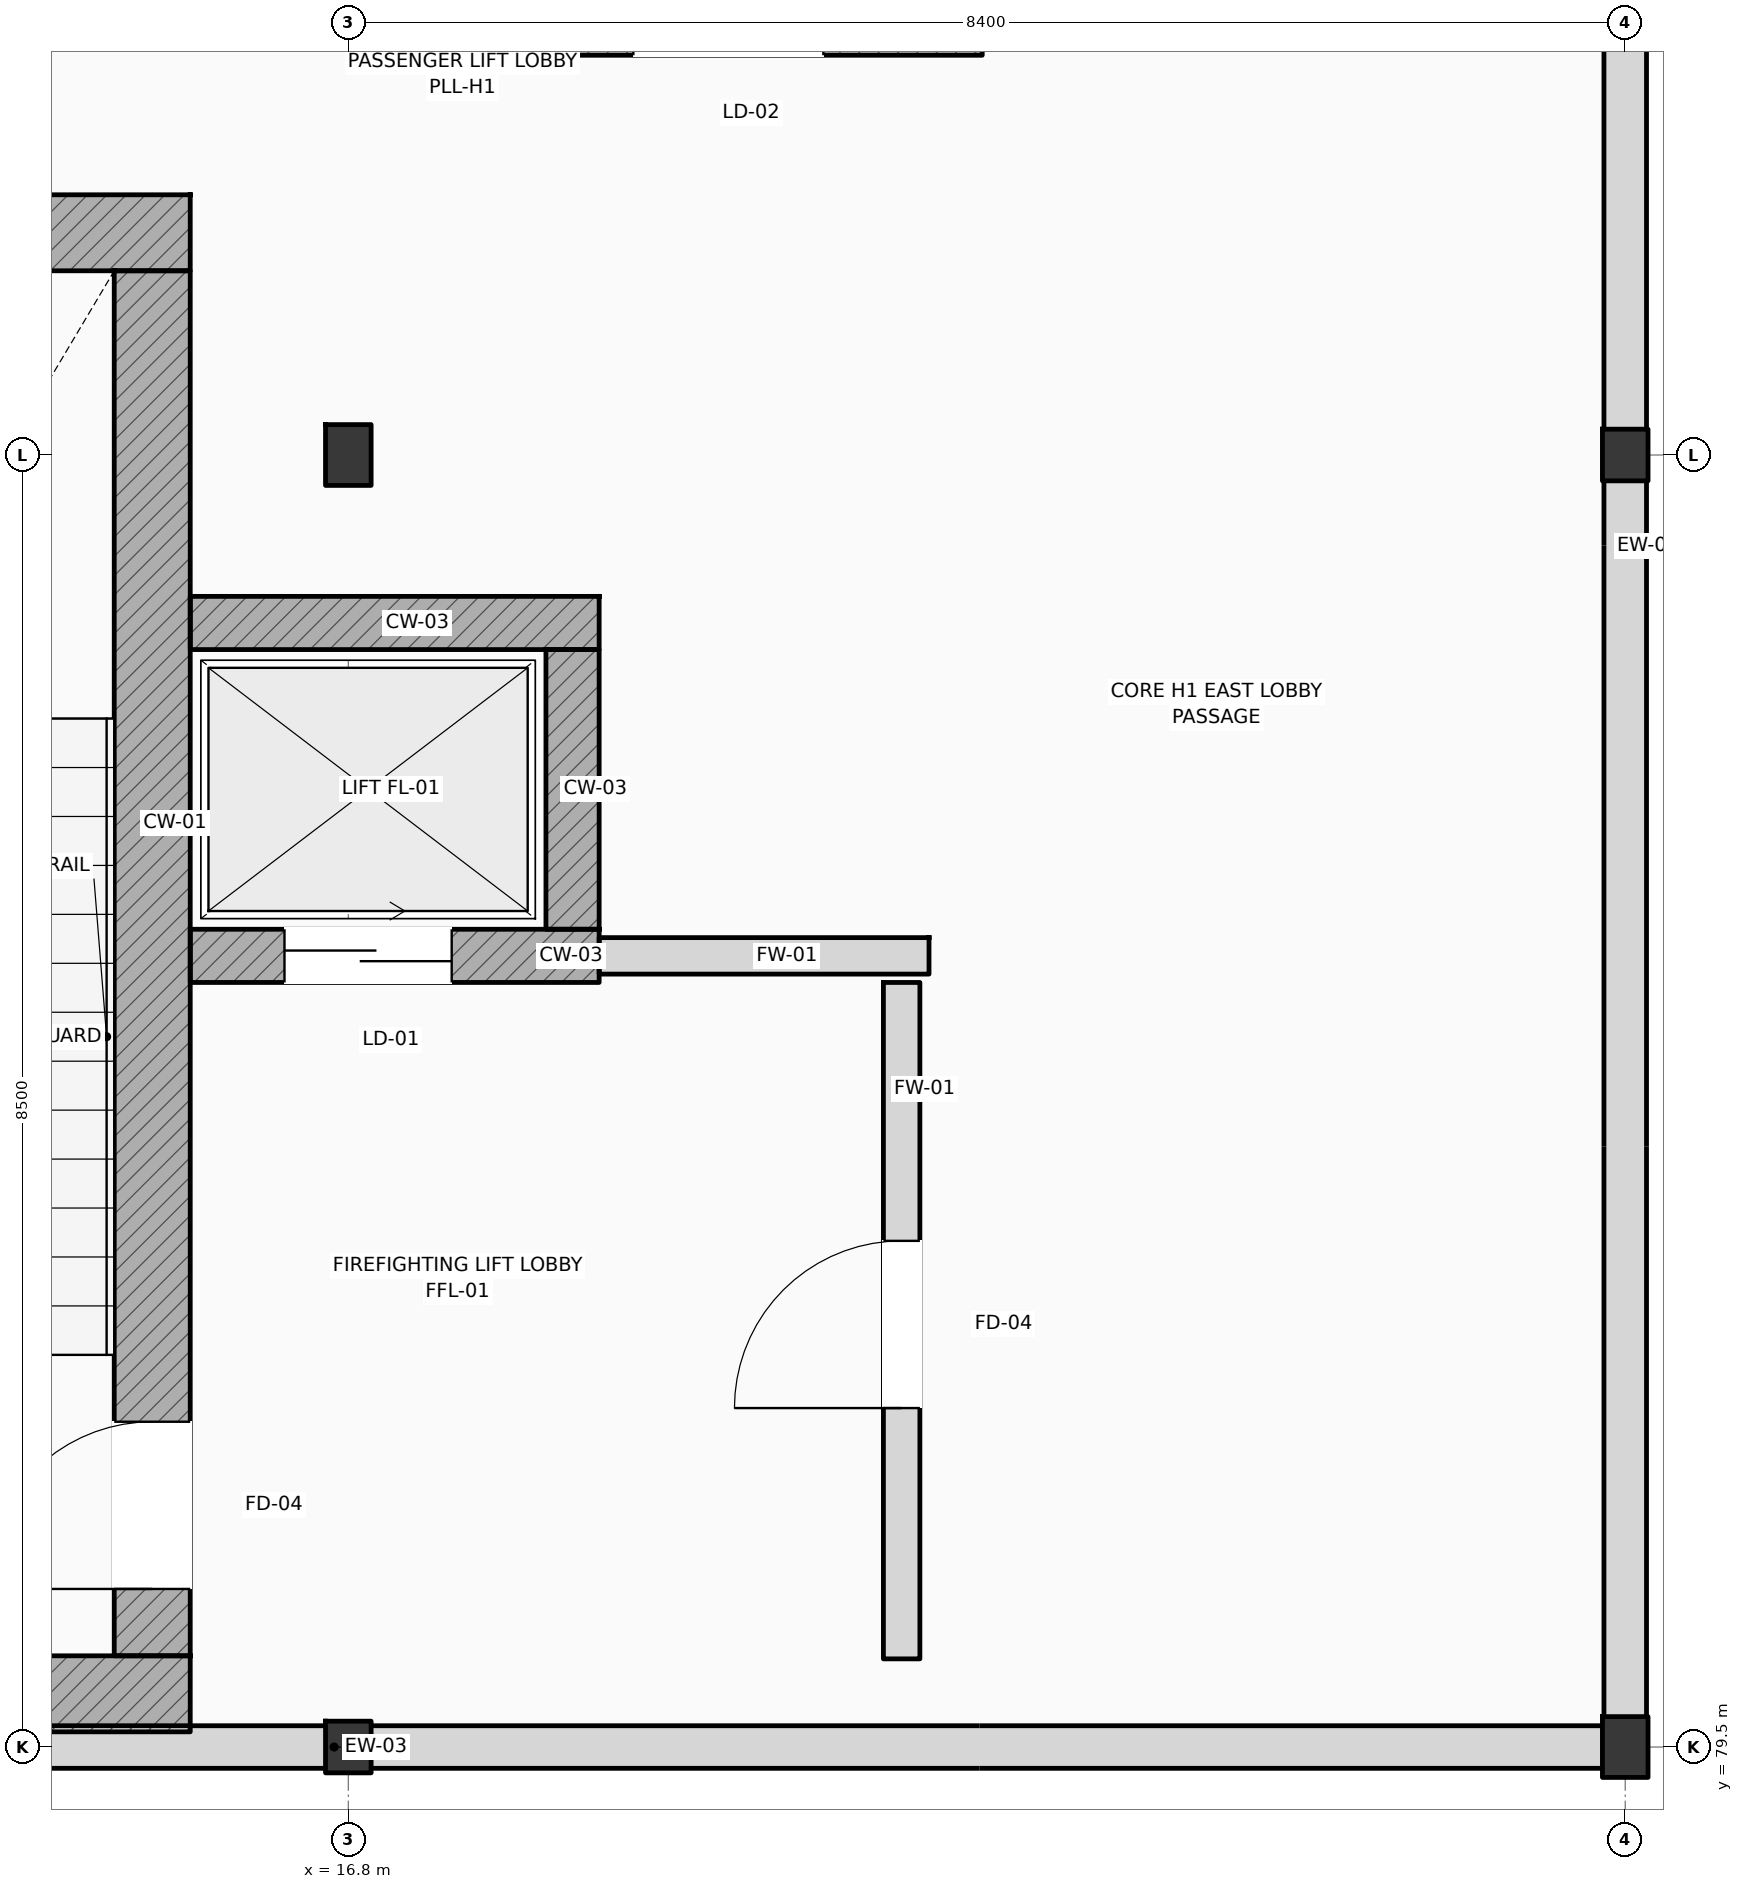
"""IFC4 building model, lengths in metres.
Left out: names, types, materials, properties, quantities, classifications, styles, units other than length and angle.
Written with IfcOpenShell. Run it as: python <this file> out.ifc"""

import sys

from ifc_helpers import new_model, si_unit, direction, frame, frame_2d, origin, origin_2d, place, context, subcontext, project, spatial, rectangle, i_section, extrude, element, fill, save


model = new_model("IFC4")
c1 = context("Model", 3, precision=1e-05, world=origin(), true_north=direction((0.0, 1.0)))
c2 = subcontext(c1, "Body", "Model", "MODEL_VIEW")
j1 = project(units=[si_unit("LENGTHUNIT", "METRE"), si_unit("PLANEANGLEUNIT", "RADIAN")], contexts=[c1])
p1 = place(None, origin())
s1 = spatial("IfcSite", under=j1, at=p1, CompositionType="ELEMENT")
p2 = place(p1, origin())
s2 = spatial("IfcBuilding", under=s1, at=p2, CompositionType="ELEMENT")
p3 = place(p2, frame((0.0, 0.0, 46.8)))
s3 = spatial("IfcBuildingStorey", under=s2, at=p3, CompositionType="ELEMENT", Elevation=46.8)
p4 = place(p3, frame((16.8, 79.5, 0.0), z_axis=(0.0, 0.0, 1.0), x_axis=(1.0, 0.0, 0.0)))
e1 = element("IfcColumn", 1, at=p4, inside=s3, PredefinedType="COLUMN", context=c2, shape_type="SweptSolid", body=[
    extrude(i_section(OverallWidth=0.3, OverallDepth=0.34, WebThickness=0.012, FlangeThickness=0.021, FilletRadius=0.027, at=origin_2d()), origin(), (0.0, 0.0, 1.0), 4.8),
])
for number, where, z_axis, x_axis in (
    (2, (16.8, 88.0, 0.0), (0.0, 0.0, 1.0), (1.0, 0.0, 0.0)),
    (3, (25.2, 79.5, 0.0), (0.0, 0.0, 1.0), (1.0, 0.0, 0.0)),
):
    element("IfcColumn", number, at=place(p3, frame(where, z_axis=z_axis, x_axis=x_axis)), inside=s3, PredefinedType="COLUMN", context=c2, shape_type="SweptSolid", body=[
        extrude(i_section(OverallWidth=0.3, OverallDepth=0.4, WebThickness=0.013, FlangeThickness=0.024, FilletRadius=0.027, at=origin_2d()), origin(), (0.0, 0.0, 1.0), 4.8),
    ])
p5 = place(p3, frame((25.2, 88.0, 0.0), z_axis=(0.0, 0.0, 1.0), x_axis=(1.0, 0.0, 0.0)))
e4 = element("IfcColumn", 4, at=p5, inside=s3, PredefinedType="COLUMN", context=c2, shape_type="SweptSolid", body=[
    extrude(i_section(OverallWidth=0.3, OverallDepth=0.34, WebThickness=0.012, FlangeThickness=0.021, FilletRadius=0.027, at=origin_2d()), origin(), (0.0, 0.0, 1.0), 4.8),
])
for number, where, z_axis, x_axis in (
    (5, (10.6, 89.462, 0.0), (0.0, 0.0, 1.0), (1.0, 0.0, 0.0)),
    (6, (10.6, 79.85, 0.0), (0.0, 0.0, 1.0), (1.0, 0.0, 0.0)),
):
    element("IfcWall", number, at=place(p3, frame(where, z_axis=z_axis, x_axis=x_axis)), inside=s3, PredefinedType="SHEAR", context=c2, shape_type="SweptSolid", body=[
        extrude(rectangle(XDim=5.16, YDim=0.5, at=frame_2d((2.58, 0.0))), origin(), (0.0, 0.0, 1.0), 4.8),
    ])
p6 = place(p3, frame((15.51, 80.1, 0.0), z_axis=(0.0, 0.0, 1.0), x_axis=(0.0, 1.0, 0.0)))
e7 = element("IfcWall", 7, at=p6, inside=s3, PredefinedType="SHEAR", context=c2, shape_type="SweptSolid", body=[
    extrude(rectangle(XDim=9.112, YDim=0.5, at=frame_2d((4.556, 0.0))), origin(), (0.0, 0.0, 1.0), 4.8),
])
p7 = place(p6, frame((0.44, 0.0, 0.0)))
e8 = element("IfcOpeningElement", 8, at=p7, cuts=e7, PredefinedType="OPENING", context=c2, shape_type="SweptSolid", body=[
    extrude(rectangle(XDim=1.1, YDim=2.2, at=frame_2d((0.55, 1.1))), frame((0.0, 0.26, 0.0), z_axis=(0.0, -1.0, 0.0), x_axis=(1.0, 0.0, 0.0)), (0.0, 0.0, 1.0), 0.52),
])
p8 = place(p3, frame((0.0, 79.5, 0.0), z_axis=(0.0, 0.0, 1.0), x_axis=(1.0, 0.0, 0.0)))
e9 = element("IfcWall", 9, at=p8, inside=s3, PredefinedType="STANDARD", context=c2, shape_type="SweptSolid", body=[
    extrude(rectangle(XDim=25.2, YDim=0.28, at=frame_2d((12.6, 0.0))), origin(), (0.0, 0.0, 1.0), 3.98),
])
p9 = place(p3, frame((25.2, 79.5, 0.0), z_axis=(0.0, 0.0, 1.0), x_axis=(0.0, 1.0, 0.0)))
e10 = element("IfcWall", 10, at=p9, inside=s3, PredefinedType="STANDARD", context=c2, shape_type="SweptSolid", body=[
    extrude(rectangle(XDim=16.5, YDim=0.28, at=frame_2d((8.25, 0.0))), origin(), (0.0, 0.0, 1.0), 4.17),
])
p10 = place(p3, frame((15.76, 86.895, 0.0), z_axis=(0.0, 0.0, 1.0), x_axis=(1.0, 0.0, 0.0)))
e11 = element("IfcWall", 11, at=p10, inside=s3, PredefinedType="SHEAR", context=c2, shape_type="SweptSolid", body=[
    extrude(rectangle(XDim=2.69, YDim=0.35, at=frame_2d((1.345, 0.0))), origin(), (0.0, 0.0, 1.0), 4.54),
])
p11 = place(p3, frame((15.76, 84.705, 0.0), z_axis=(0.0, 0.0, 1.0), x_axis=(1.0, 0.0, 0.0)))
e12 = element("IfcWall", 12, at=p11, inside=s3, PredefinedType="SHEAR", context=c2, shape_type="SweptSolid", body=[
    extrude(rectangle(XDim=2.69, YDim=0.35, at=frame_2d((1.345, 0.0))), origin(), (0.0, 0.0, 1.0), 4.54),
])
p12 = place(p11, frame((0.62, 0.0, 0.0)))
e13 = element("IfcOpeningElement", 13, at=p12, cuts=e12, PredefinedType="OPENING", context=c2, shape_type="SweptSolid", body=[
    extrude(rectangle(XDim=1.1, YDim=2.2, at=frame_2d((0.55, 1.1))), frame((0.0, 0.185, 0.0), z_axis=(0.0, -1.0, 0.0), x_axis=(1.0, 0.0, 0.0)), (0.0, 0.0, 1.0), 0.37),
])
p13 = place(p3, frame((18.275, 84.88, 0.0), z_axis=(0.0, 0.0, 1.0), x_axis=(0.0, 1.0, 0.0)))
e14 = element("IfcWall", 14, at=p13, inside=s3, PredefinedType="SHEAR", context=c2, shape_type="SweptSolid", body=[
    extrude(rectangle(XDim=1.84, YDim=0.35, at=frame_2d((0.92, 0.0))), origin(), (0.0, 0.0, 1.0), 4.54),
])
p14 = place(p3, frame((17.63, 90.805, 0.0), z_axis=(0.0, 0.0, 1.0), x_axis=(1.0, 0.0, 0.0)))
e15 = element("IfcWall", 15, at=p14, inside=s3, PredefinedType="SHEAR", context=c2, shape_type="SweptSolid", body=[
    extrude(rectangle(XDim=3.34, YDim=0.35, at=frame_2d((1.67, 0.0))), origin(), (0.0, 0.0, 1.0), 4.54),
])
p15 = place(p14, frame((1.045, 0.0, 0.0)))
e16 = element("IfcOpeningElement", 16, at=p15, cuts=e15, PredefinedType="OPENING", context=c2, shape_type="SweptSolid", body=[
    extrude(rectangle(XDim=1.25, YDim=2.25, at=frame_2d((0.625, 1.125))), frame((0.0, 0.185, 0.0), z_axis=(0.0, -1.0, 0.0), x_axis=(1.0, 0.0, 0.0)), (0.0, 0.0, 1.0), 0.37),
])
p16 = place(p3, frame((18.45, 84.705, 0.0), z_axis=(0.0, 0.0, 1.0), x_axis=(1.0, 0.0, 0.0)))
e17 = element("IfcWall", 17, at=p16, inside=s3, PredefinedType="STANDARD", context=c2, shape_type="SweptSolid", body=[
    extrude(rectangle(XDim=2.17, YDim=0.24, at=frame_2d((1.085, 0.0))), origin(), (0.0, 0.0, 1.0), 4.54),
])
p17 = place(p3, frame((20.44, 80.08, 0.0), z_axis=(0.0, 0.0, 1.0), x_axis=(0.0, 1.0, 0.0)))
e18 = element("IfcWall", 18, at=p17, inside=s3, PredefinedType="STANDARD", context=c2, shape_type="SweptSolid", body=[
    extrude(rectangle(XDim=4.45, YDim=0.24, at=frame_2d((2.225, 0.0))), origin(), (0.0, 0.0, 1.0), 4.54),
])
p18 = place(p17, frame((1.65, 0.0, 0.0)))
e19 = element("IfcOpeningElement", 19, at=p18, cuts=e18, PredefinedType="OPENING", context=c2, shape_type="SweptSolid", body=[
    extrude(rectangle(XDim=1.1, YDim=2.2, at=frame_2d((0.55, 1.1))), frame((0.0, 0.13, 0.0), z_axis=(0.0, -1.0, 0.0), x_axis=(1.0, 0.0, 0.0)), (0.0, 0.0, 1.0), 0.26),
])
p19 = place(p7, origin())
e20 = element("IfcDoor", 20, at=p19, inside=s3, OperationType="SINGLE_SWING_LEFT", PredefinedType="DOOR", context=c2, shape_type="SweptSolid", body=[
    extrude(rectangle(XDim=1.1, YDim=2.2, at=frame_2d((0.55, 1.1))), frame((0.0, 0.025, 0.0), z_axis=(0.0, -1.0, 0.0), x_axis=(1.0, 0.0, 0.0)), (0.0, 0.0, 1.0), 0.05),
])
fill(e8, e20)
p20 = place(p12, origin())
e21 = element("IfcDoor", 21, at=p20, inside=s3, OperationType="SLIDING_TO_LEFT", PredefinedType="DOOR", context=c2, shape_type="SweptSolid", body=[
    extrude(rectangle(XDim=1.1, YDim=2.2, at=frame_2d((0.55, 1.1))), frame((0.0, 0.025, 0.0), z_axis=(0.0, -1.0, 0.0), x_axis=(1.0, 0.0, 0.0)), (0.0, 0.0, 1.0), 0.05),
])
fill(e13, e21)
p21 = place(p18, origin())
e22 = element("IfcDoor", 22, at=p21, inside=s3, OperationType="SINGLE_SWING_LEFT", PredefinedType="DOOR", context=c2, shape_type="SweptSolid", body=[
    extrude(rectangle(XDim=1.1, YDim=2.2, at=frame_2d((0.55, 1.1))), frame((0.0, 0.025, 0.0), z_axis=(0.0, -1.0, 0.0), x_axis=(1.0, 0.0, 0.0)), (0.0, 0.0, 1.0), 0.05),
])
fill(e19, e22)
save(model, sys.argv[1])
